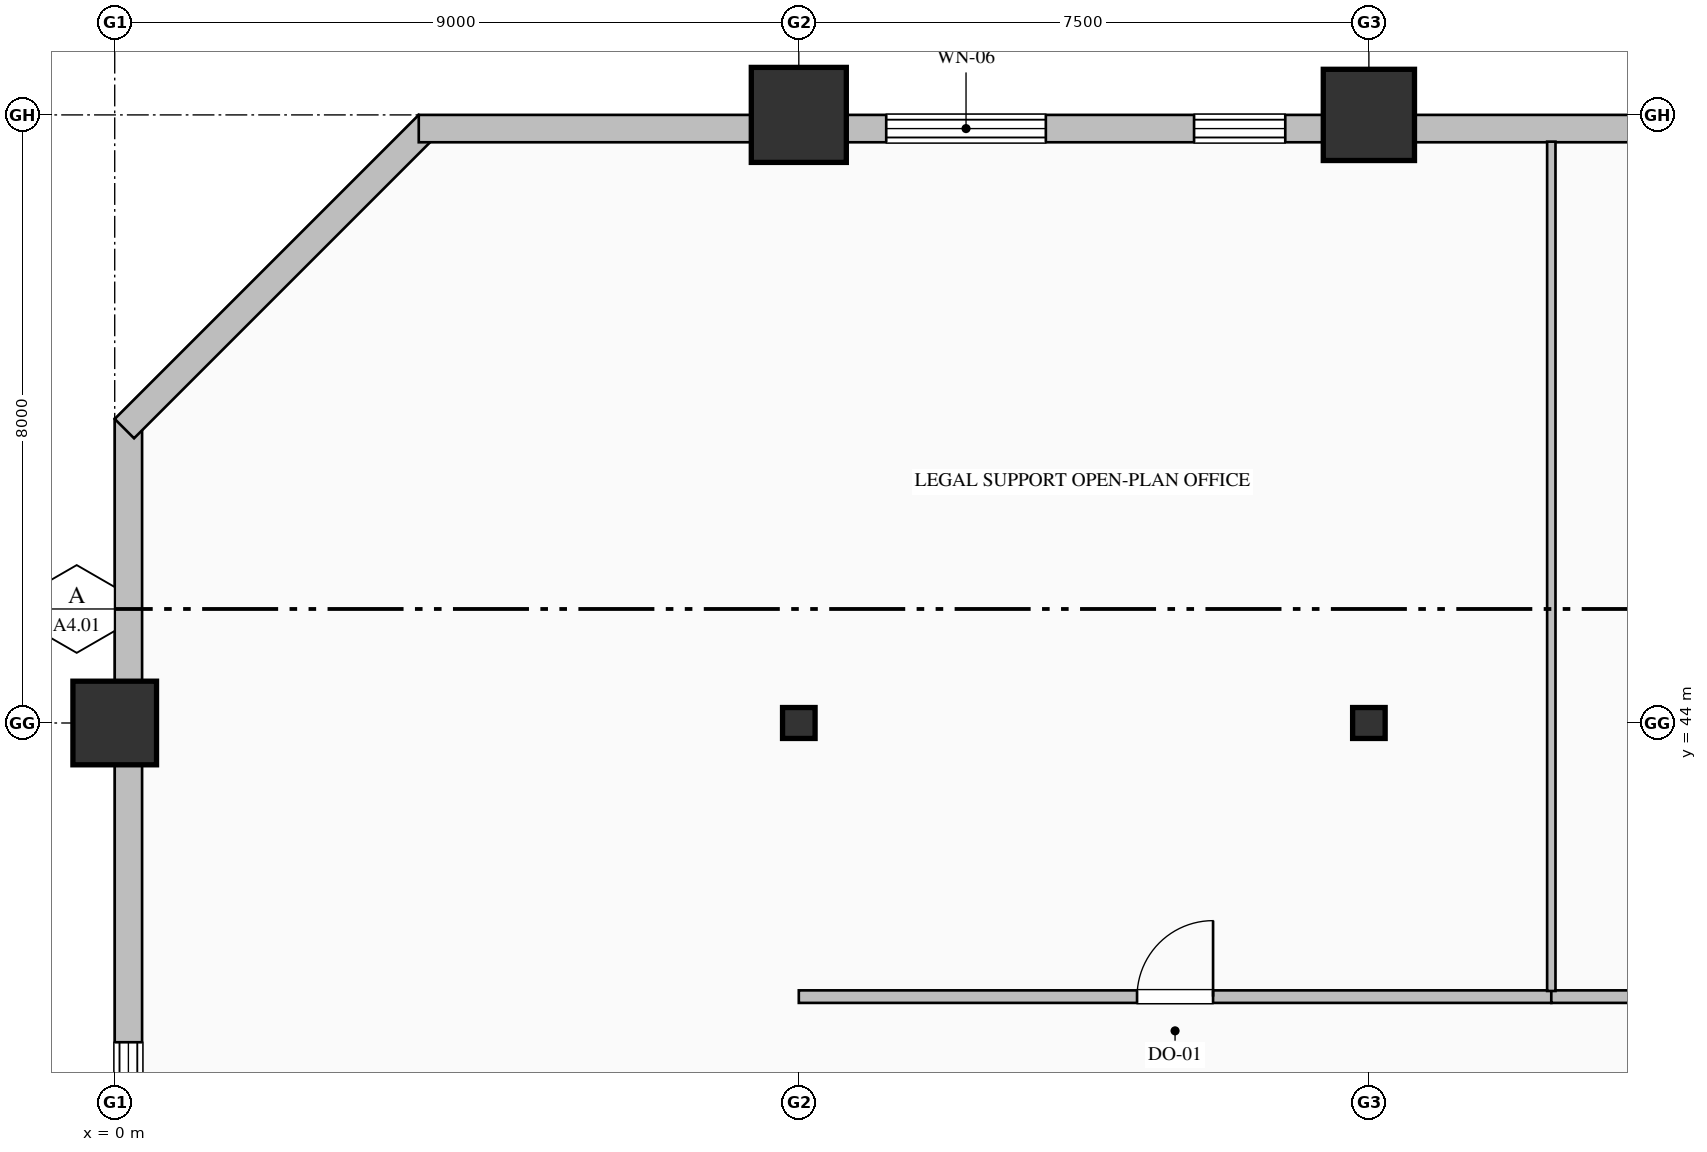
"""IFC4 building model, lengths in metres.
Left out: names, types, materials, properties, quantities, classifications, styles, units other than length and angle.
Written with IfcOpenShell. Run it as: python <this file> out.ifc"""

import sys

from ifc_helpers import new_model, si_unit, direction, frame, frame_2d, origin, origin_2d, place, context, subcontext, project, spatial, rectangle, hollow_rectangle, hollow_circle, i_section, extrude, element, fill, save


model = new_model("IFC4")
c1 = context("Model", 3, precision=1e-05, world=origin(), true_north=direction((0.0, 1.0)))
c2 = subcontext(c1, "Body", "Model", "MODEL_VIEW")
j1 = project(units=[si_unit("LENGTHUNIT", "METRE"), si_unit("PLANEANGLEUNIT", "RADIAN")], contexts=[c1])
p1 = place(None, origin())
s1 = spatial("IfcSite", under=j1, at=p1, CompositionType="ELEMENT")
p2 = place(p1, origin())
s2 = spatial("IfcBuilding", under=s1, at=p2, CompositionType="ELEMENT")
p3 = place(p2, frame((0.0, 0.0, 104.2)))
s3 = spatial("IfcBuildingStorey", under=s2, at=p3, CompositionType="ELEMENT", Elevation=104.2)
p4 = place(p3, frame((0.0, 44.0, 0.0), z_axis=(0.0, 0.0, 1.0), x_axis=(1.0, 0.0, 0.0)))
e1 = element("IfcColumn", 1, at=p4, inside=s3, PredefinedType="COLUMN", context=c2, shape_type="SweptSolid", body=[
    extrude(hollow_rectangle(XDim=1.1, YDim=1.1, WallThickness=0.04, at=origin_2d()), origin(), (0.0, 0.0, 1.0), 4.0),
])
p5 = place(p3, frame((9.0, 44.0, 0.0), z_axis=(0.0, 0.0, 1.0), x_axis=(1.0, 0.0, 0.0)))
e2 = element("IfcColumn", 2, at=p5, inside=s3, PredefinedType="COLUMN", context=c2, shape_type="SweptSolid", body=[
    extrude(i_section(OverallWidth=0.407, OverallDepth=0.428, WebThickness=0.02, FlangeThickness=0.035, FilletRadius=0.022, at=origin_2d()), origin(), (0.0, 0.0, 1.0), 4.0),
])
p6 = place(p3, frame((9.0, 52.0, 0.0), z_axis=(0.0, 0.0, 1.0), x_axis=(1.0, 0.0, 0.0)))
e3 = element("IfcColumn", 3, at=p6, inside=s3, PredefinedType="COLUMN", context=c2, shape_type="SweptSolid", body=[
    extrude(hollow_rectangle(XDim=1.25, YDim=1.25, WallThickness=0.045, at=origin_2d()), origin(), (0.0, 0.0, 1.0), 4.0),
])
p7 = place(p3, frame((16.5, 44.0, 0.0), z_axis=(0.0, 0.0, 1.0), x_axis=(1.0, 0.0, 0.0)))
e4 = element("IfcColumn", 4, at=p7, inside=s3, PredefinedType="COLUMN", context=c2, shape_type="SweptSolid", body=[
    extrude(i_section(OverallWidth=0.407, OverallDepth=0.428, WebThickness=0.02, FlangeThickness=0.035, FilletRadius=0.022, at=origin_2d()), origin(), (0.0, 0.0, 1.0), 4.0),
])
p8 = place(p3, frame((16.5, 52.0, 0.0), z_axis=(0.0, 0.0, 1.0), x_axis=(1.0, 0.0, 0.0)))
e5 = element("IfcColumn", 5, at=p8, inside=s3, PredefinedType="COLUMN", context=c2, shape_type="SweptSolid", body=[
    extrude(hollow_circle(Radius=0.6, WallThickness=0.04, at=origin_2d()), origin(), (0.0, 0.0, 1.0), 4.0),
])
p9 = place(p3, frame((0.18, 32.0, 0.0), z_axis=(0.0, 0.0, 1.0), x_axis=(0.0, 1.0, 0.0)))
e6 = element("IfcWall", 6, at=p9, inside=s3, PredefinedType="SOLIDWALL", context=c2, shape_type="SweptSolid", body=[
    extrude(rectangle(XDim=16.0, YDim=0.36, at=frame_2d((8.0, 0.0))), origin(), (0.0, 0.0, 1.0), 3.15),
])
p10 = place(p9, frame((6.6, 0.0, 0.7)))
e7 = element("IfcOpeningElement", 7, at=p10, cuts=e6, PredefinedType="OPENING", context=c2, shape_type="SweptSolid", body=[
    extrude(rectangle(XDim=1.2, YDim=1.85, at=frame_2d((0.6, 0.925))), frame((0.0, 0.19, 0.0), z_axis=(0.0, -1.0, 0.0), x_axis=(1.0, 0.0, 0.0)), (0.0, 0.0, 1.0), 0.38),
])
p11 = place(p3, frame((0.127, 47.873, 0.0), z_axis=(0.0, 0.0, 1.0), x_axis=(0.707106781187, 0.707106781187, 0.0)))
e8 = element("IfcWall", 8, at=p11, inside=s3, PredefinedType="SOLIDWALL", context=c2, shape_type="SweptSolid", body=[
    extrude(rectangle(XDim=5.657, YDim=0.36, at=frame_2d((2.828, 0.0))), origin(), (0.0, 0.0, 1.0), 3.65),
])
p12 = place(p3, frame((4.0, 51.82, 0.0), z_axis=(0.0, 0.0, 1.0), x_axis=(1.0, 0.0, 0.0)))
e9 = element("IfcWall", 9, at=p12, inside=s3, PredefinedType="SOLIDWALL", context=c2, shape_type="SweptSolid", body=[
    extrude(rectangle(XDim=36.52, YDim=0.36, at=frame_2d((18.26, 0.0))), origin(), (0.0, 0.0, 1.0), 3.15),
])
p13 = place(p12, frame((6.15, 0.0, 0.85)))
e10 = element("IfcOpeningElement", 10, at=p13, cuts=e9, PredefinedType="OPENING", context=c2, shape_type="SweptSolid", body=[
    extrude(rectangle(XDim=2.1, YDim=2.05, at=frame_2d((1.05, 1.025))), frame((0.0, 0.19, 0.0), z_axis=(0.0, -1.0, 0.0), x_axis=(1.0, 0.0, 0.0)), (0.0, 0.0, 1.0), 0.38),
])
p14 = place(p12, frame((10.2, 0.0, 0.7)))
e11 = element("IfcOpeningElement", 11, at=p14, cuts=e9, PredefinedType="OPENING", context=c2, shape_type="SweptSolid", body=[
    extrude(rectangle(XDim=1.2, YDim=1.85, at=frame_2d((0.6, 0.925))), frame((0.0, 0.19, 0.0), z_axis=(0.0, -1.0, 0.0), x_axis=(1.0, 0.0, 0.0)), (0.0, 0.0, 1.0), 0.38),
])
p15 = place(p12, frame((16.95, 0.0, 0.85)))
e12 = element("IfcOpeningElement", 12, at=p15, cuts=e9, PredefinedType="OPENING", context=c2, shape_type="SweptSolid", body=[
    extrude(rectangle(XDim=2.1, YDim=2.05, at=frame_2d((1.05, 1.025))), frame((0.0, 0.19, 0.0), z_axis=(0.0, -1.0, 0.0), x_axis=(1.0, 0.0, 0.0)), (0.0, 0.0, 1.0), 0.38),
])
p16 = place(p12, frame((31.8, 0.0, 0.7)))
e13 = element("IfcOpeningElement", 13, at=p16, cuts=e9, PredefinedType="OPENING", context=c2, shape_type="SweptSolid", body=[
    extrude(rectangle(XDim=1.2, YDim=1.85, at=frame_2d((0.6, 0.925))), frame((0.0, 0.19, 0.0), z_axis=(0.0, -1.0, 0.0), x_axis=(1.0, 0.0, 0.0)), (0.0, 0.0, 1.0), 0.38),
])
p17 = place(p3, frame((9.0, 40.4, 0.0), z_axis=(0.0, 0.0, 1.0), x_axis=(1.0, 0.0, 0.0)))
e14 = element("IfcWall", 14, at=p17, inside=s3, PredefinedType="PARTITIONING", context=c2, shape_type="SweptSolid", body=[
    extrude(rectangle(XDim=9.9, YDim=0.165, at=frame_2d((4.95, 0.0))), origin(), (0.0, 0.0, 1.0), 3.65),
])
p18 = place(p17, frame((4.45, 0.0, 0.0)))
e15 = element("IfcOpeningElement", 15, at=p18, cuts=e14, PredefinedType="OPENING", context=c2, shape_type="SweptSolid", body=[
    extrude(rectangle(XDim=1.0, YDim=2.15, at=frame_2d((0.5, 1.075))), frame((0.0, 0.093, 0.0), z_axis=(0.0, -1.0, 0.0), x_axis=(1.0, 0.0, 0.0)), (0.0, 0.0, 1.0), 0.185),
])
p19 = place(p3, frame((18.9, 40.4, 0.0), z_axis=(0.0, 0.0, 1.0), x_axis=(1.0, 0.0, 0.0)))
e16 = element("IfcWall", 16, at=p19, inside=s3, PredefinedType="PARTITIONING", context=c2, shape_type="SweptSolid", body=[
    extrude(rectangle(XDim=9.45, YDim=0.165, at=frame_2d((4.725, 0.0))), origin(), (0.0, 0.0, 1.0), 3.65),
])
p20 = place(p19, frame((4.275, 0.0, 0.0)))
e17 = element("IfcOpeningElement", 17, at=p20, cuts=e16, PredefinedType="OPENING", context=c2, shape_type="SweptSolid", body=[
    extrude(rectangle(XDim=0.9, YDim=2.15, at=frame_2d((0.45, 1.075))), frame((0.0, 0.093, 0.0), z_axis=(0.0, -1.0, 0.0), x_axis=(1.0, 0.0, 0.0)), (0.0, 0.0, 1.0), 0.185),
])
p21 = place(p3, frame((18.9, 51.648, 0.0), z_axis=(0.0, 0.0, 1.0), x_axis=(0.0, -1.0, 0.0)))
e18 = element("IfcWall", 18, at=p21, inside=s3, PredefinedType="MOVABLE", context=c2, shape_type="SweptSolid", body=[
    extrude(rectangle(XDim=11.173, YDim=0.11, at=frame_2d((5.587, 0.0))), origin(), (0.0, 0.0, 1.0), 3.65),
])
p22 = place(p10, origin())
e19 = element("IfcWindow", 19, at=p22, inside=s3, PartitioningType="DOUBLE_PANEL_VERTICAL", PredefinedType="WINDOW", context=c2, shape_type="SweptSolid", body=[
    extrude(rectangle(XDim=1.2, YDim=1.85, at=frame_2d((0.6, 0.925))), frame((0.0, 0.15, 0.0), z_axis=(0.0, -1.0, 0.0), x_axis=(1.0, 0.0, 0.0)), (0.0, 0.0, 1.0), 0.06),
])
fill(e7, e19)
p23 = place(p13, origin())
e20 = element("IfcWindow", 20, at=p23, inside=s3, PartitioningType="TRIPLE_PANEL_VERTICAL", PredefinedType="WINDOW", context=c2, shape_type="SweptSolid", body=[
    extrude(rectangle(XDim=2.1, YDim=2.05, at=frame_2d((1.05, 1.025))), frame((0.0, 0.15, 0.0), z_axis=(0.0, -1.0, 0.0), x_axis=(1.0, 0.0, 0.0)), (0.0, 0.0, 1.0), 0.06),
])
fill(e10, e20)
p24 = place(p14, origin())
e21 = element("IfcWindow", 21, at=p24, inside=s3, PartitioningType="DOUBLE_PANEL_VERTICAL", PredefinedType="WINDOW", context=c2, shape_type="SweptSolid", body=[
    extrude(rectangle(XDim=1.2, YDim=1.85, at=frame_2d((0.6, 0.925))), frame((0.0, 0.15, 0.0), z_axis=(0.0, -1.0, 0.0), x_axis=(1.0, 0.0, 0.0)), (0.0, 0.0, 1.0), 0.06),
])
fill(e11, e21)
p25 = place(p18, origin())
e22 = element("IfcDoor", 22, at=p25, inside=s3, OperationType="SINGLE_SWING_RIGHT", PredefinedType="DOOR", context=c2, shape_type="SweptSolid", body=[
    extrude(rectangle(XDim=1.0, YDim=2.15, at=frame_2d((0.5, 1.075))), frame((0.0, 0.025, 0.0), z_axis=(0.0, -1.0, 0.0), x_axis=(1.0, 0.0, 0.0)), (0.0, 0.0, 1.0), 0.05),
])
fill(e15, e22)
save(model, sys.argv[1])
